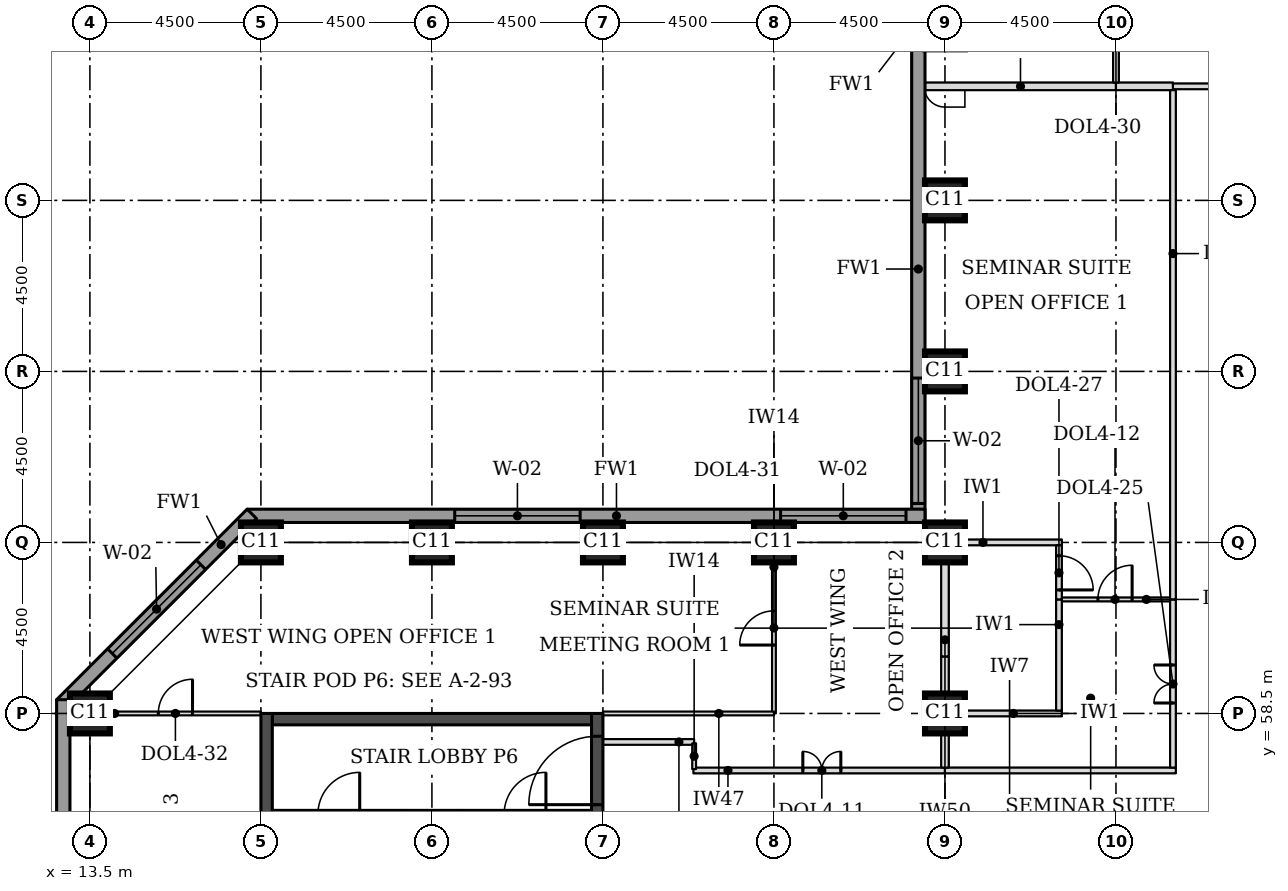
"""IFC4 building model, lengths in metres.
Left out: names, types, materials, properties, quantities, classifications, styles, units other than length and angle.
Written with IfcOpenShell. Run it as: python <this file> out.ifc"""

import sys

from ifc_helpers import new_model, si_unit, direction, frame, frame_2d, origin, origin_2d, place, context, subcontext, project, spatial, rectangle, extrude, element, fill, save


model = new_model("IFC4")
c1 = context("Model", 3, precision=1e-05, world=origin(), true_north=direction((0.0, 1.0)))
c2 = subcontext(c1, "Body", "Model", "MODEL_VIEW")
j1 = project(units=[si_unit("LENGTHUNIT", "METRE"), si_unit("PLANEANGLEUNIT", "RADIAN")], contexts=[c1])
p1 = place(None, origin())
s1 = spatial("IfcSite", under=j1, at=p1, CompositionType="ELEMENT")
p2 = place(p1, origin())
s2 = spatial("IfcBuilding", under=s1, at=p2, CompositionType="ELEMENT")
p3 = place(p2, frame((0.0, 0.0, 101.1)))
s3 = spatial("IfcBuildingStorey", under=s2, at=p3, CompositionType="ELEMENT", Elevation=101.1)
for number, where, z_axis, x_axis in (
    (1, (13.5, 58.5, 0.0), (0.0, 0.0, 1.0), (1.0, 0.0, 0.0)),
    (2, (36.0, 58.5, 0.0), (0.0, 0.0, 1.0), (1.0, 0.0, 0.0)),
    (3, (18.0, 63.0, 0.0), (0.0, 0.0, 1.0), (1.0, 0.0, 0.0)),
    (4, (22.5, 63.0, 0.0), (0.0, 0.0, 1.0), (1.0, 0.0, 0.0)),
    (5, (27.0, 63.0, 0.0), (0.0, 0.0, 1.0), (1.0, 0.0, 0.0)),
    (6, (31.5, 63.0, 0.0), (0.0, 0.0, 1.0), (1.0, 0.0, 0.0)),
    (7, (36.0, 63.0, 0.0), (0.0, 0.0, 1.0), (1.0, 0.0, 0.0)),
    (8, (36.0, 67.5, 0.0), (0.0, 0.0, 1.0), (1.0, 0.0, 0.0)),
    (9, (36.0, 72.0, 0.0), (0.0, 0.0, 1.0), (1.0, 0.0, 0.0)),
):
    element("IfcColumn", number, at=place(p3, frame(where, z_axis=z_axis, x_axis=x_axis)), inside=s3, PredefinedType="COLUMN", context=c2, shape_type="SweptSolid", body=[
        extrude(rectangle(XDim=1.05, YDim=1.05, at=origin_2d()), origin(), (0.0, 0.0, 1.0), 3.7),
    ])
p4 = place(p3, frame((18.3, 58.35, 0.0), z_axis=(0.0, 0.0, 1.0), x_axis=(1.0, 0.0, 0.0)))
e10 = element("IfcWall", 10, at=p4, inside=s3, PredefinedType="SHEAR", context=c2, shape_type="SweptSolid", body=[
    extrude(rectangle(XDim=8.4, YDim=0.3, at=frame_2d((4.2, 0.0))), origin(), (0.0, 0.0, 1.0), 3.7),
])
p5 = place(p3, frame((18.15, 49.5, 0.0), z_axis=(0.0, 0.0, 1.0), x_axis=(0.0, 1.0, 0.0)))
e11 = element("IfcWall", 11, at=p5, inside=s3, PredefinedType="SHEAR", context=c2, shape_type="SweptSolid", body=[
    extrude(rectangle(XDim=9.0, YDim=0.3, at=frame_2d((4.5, 0.0))), origin(), (0.0, 0.0, 1.0), 3.7),
])
p6 = place(p3, frame((26.85, 49.5, 0.0), z_axis=(0.0, 0.0, 1.0), x_axis=(0.0, 1.0, 0.0)))
e12 = element("IfcWall", 12, at=p6, inside=s3, PredefinedType="SHEAR", context=c2, shape_type="SweptSolid", body=[
    extrude(rectangle(XDim=9.0, YDim=0.3, at=frame_2d((4.5, 0.0))), origin(), (0.0, 0.0, 1.0), 3.7),
])
p7 = place(p6, frame((6.6, 0.0, 0.0)))
e13 = element("IfcOpeningElement", 13, at=p7, cuts=e12, PredefinedType="OPENING", context=c2, shape_type="SweptSolid", body=[
    extrude(rectangle(XDim=1.8, YDim=2.1, at=frame_2d((0.9, 1.05))), frame((0.0, 0.16, 0.0), z_axis=(0.0, -1.0, 0.0), x_axis=(1.0, 0.0, 0.0)), (0.0, 0.0, 1.0), 0.32),
])
p8 = place(p3, frame((35.3, 76.862, 0.0), z_axis=(0.0, 0.0, 1.0), x_axis=(0.0, -1.0, 0.0)))
e14 = element("IfcWall", 14, at=p8, inside=s3, PredefinedType="STANDARD", context=c2, shape_type="SweptSolid", body=[
    extrude(rectangle(XDim=13.337, YDim=0.35, at=frame_2d((6.669, 0.0))), origin(), (0.0, 0.0, 1.0), 3.525),
])
p9 = place(p8, frame((9.537, 0.0, 0.9)))
e15 = element("IfcOpeningElement", 15, at=p9, cuts=e14, PredefinedType="OPENING", context=c2, shape_type="SweptSolid", body=[
    extrude(rectangle(XDim=3.3, YDim=1.9, at=frame_2d((1.65, 0.95))), frame((0.0, 0.185, 0.0), z_axis=(0.0, -1.0, 0.0), x_axis=(1.0, 0.0, 0.0)), (0.0, 0.0, 1.0), 0.37),
])
p10 = place(p3, frame((35.475, 63.7, 0.0), z_axis=(0.0, 0.0, 1.0), x_axis=(-1.0, 0.0, 0.0)))
e16 = element("IfcWall", 16, at=p10, inside=s3, PredefinedType="STANDARD", context=c2, shape_type="SweptSolid", body=[
    extrude(rectangle(XDim=17.837, YDim=0.35, at=frame_2d((8.919, 0.0))), origin(), (0.0, 0.0, 1.0), 3.525),
])
p11 = place(p10, frame((0.5, 0.0, 0.9)))
e17 = element("IfcOpeningElement", 17, at=p11, cuts=e16, PredefinedType="OPENING", context=c2, shape_type="SweptSolid", body=[
    extrude(rectangle(XDim=3.3, YDim=1.9, at=frame_2d((1.65, 0.95))), frame((0.0, 0.185, 0.0), z_axis=(0.0, -1.0, 0.0), x_axis=(1.0, 0.0, 0.0)), (0.0, 0.0, 1.0), 0.37),
])
p12 = place(p10, frame((9.075, 0.0, 0.9)))
e18 = element("IfcOpeningElement", 18, at=p12, cuts=e16, PredefinedType="OPENING", context=c2, shape_type="SweptSolid", body=[
    extrude(rectangle(XDim=3.3, YDim=1.9, at=frame_2d((1.65, 0.95))), frame((0.0, 0.185, 0.0), z_axis=(0.0, -1.0, 0.0), x_axis=(1.0, 0.0, 0.0)), (0.0, 0.0, 1.0), 0.37),
])
p13 = place(p3, frame((17.761, 63.751, 0.0), z_axis=(0.0, 0.0, 1.0), x_axis=(-0.707106781187, -0.707106781187, 0.0)))
e19 = element("IfcWall", 19, at=p13, inside=s3, PredefinedType="STANDARD", context=c2, shape_type="SweptSolid", body=[
    extrude(rectangle(XDim=7.089, YDim=0.35, at=frame_2d((3.544, 0.0))), origin(), (0.0, 0.0, 1.0), 3.525),
])
p14 = place(p13, frame((1.894, 0.0, 0.9)))
e20 = element("IfcOpeningElement", 20, at=p14, cuts=e19, PredefinedType="OPENING", context=c2, shape_type="SweptSolid", body=[
    extrude(rectangle(XDim=3.3, YDim=1.9, at=frame_2d((1.65, 0.95))), frame((0.0, 0.185, 0.0), z_axis=(0.0, -1.0, 0.0), x_axis=(1.0, 0.0, 0.0)), (0.0, 0.0, 1.0), 0.37),
])
p15 = place(p3, frame((12.8, 58.862, 0.0), z_axis=(0.0, 0.0, 1.0), x_axis=(0.0, -1.0, 0.0)))
e21 = element("IfcWall", 21, at=p15, inside=s3, PredefinedType="STANDARD", context=c2, shape_type="SweptSolid", body=[
    extrude(rectangle(XDim=14.225, YDim=0.35, at=frame_2d((7.112, 0.0))), origin(), (0.0, 0.0, 1.0), 3.525),
])
p16 = place(p15, frame((5.462, 0.0, 0.9)))
e22 = element("IfcOpeningElement", 22, at=p16, cuts=e21, PredefinedType="OPENING", context=c2, shape_type="SweptSolid", body=[
    extrude(rectangle(XDim=3.3, YDim=1.9, at=frame_2d((1.65, 0.95))), frame((0.0, 0.185, 0.0), z_axis=(0.0, -1.0, 0.0), x_axis=(1.0, 0.0, 0.0)), (0.0, 0.0, 1.0), 0.37),
])
p17 = place(p3, frame((29.38, 57.0, 0.0), z_axis=(0.0, 0.0, 1.0), x_axis=(1.0, 0.0, 0.0)))
e23 = element("IfcWall", 23, at=p17, inside=s3, PredefinedType="PARTITIONING", context=c2, shape_type="SweptSolid", body=[
    extrude(rectangle(XDim=6.62, YDim=0.15, at=frame_2d((3.31, 0.0))), origin(), (0.0, 0.0, 1.0), 3.55),
])
p18 = place(p17, frame((2.88, 0.0, 0.0)))
e24 = element("IfcOpeningElement", 24, at=p18, cuts=e23, PredefinedType="OPENING", context=c2, shape_type="SweptSolid", body=[
    extrude(rectangle(XDim=1.0, YDim=2.1, at=frame_2d((0.5, 1.05))), frame((0.0, 0.085, 0.0), z_axis=(0.0, -1.0, 0.0), x_axis=(1.0, 0.0, 0.0)), (0.0, 0.0, 1.0), 0.17),
])
p19 = place(p3, frame((36.0, 57.0, 0.0), z_axis=(0.0, 0.0, 1.0), x_axis=(1.0, 0.0, 0.0)))
e25 = element("IfcWall", 25, at=p19, inside=s3, PredefinedType="PARTITIONING", context=c2, shape_type="SweptSolid", body=[
    extrude(rectangle(XDim=6.075, YDim=0.15, at=frame_2d((3.038, 0.0))), origin(), (0.0, 0.0, 1.0), 3.55),
])
p20 = place(p3, frame((36.525, 58.5, 0.0), z_axis=(0.0, 0.0, 1.0), x_axis=(1.0, 0.0, 0.0)))
e26 = element("IfcWall", 26, at=p20, inside=s3, PredefinedType="PARTITIONING", context=c2, shape_type="SweptSolid", body=[
    extrude(rectangle(XDim=2.55, YDim=0.15, at=frame_2d((1.275, 0.0))), origin(), (0.0, 0.0, 1.0), 3.55),
])
p21 = place(p3, frame((39.075, 61.5, 0.0), z_axis=(0.0, 0.0, 1.0), x_axis=(1.0, 0.0, 0.0)))
e27 = element("IfcWall", 27, at=p21, inside=s3, PredefinedType="PARTITIONING", context=c2, shape_type="SweptSolid", body=[
    extrude(rectangle(XDim=2.85, YDim=0.1, at=frame_2d((1.425, 0.0))), origin(), (0.0, 0.0, 1.0), 3.55),
])
p22 = place(p21, frame((0.95, 0.0, 0.0)))
e28 = element("IfcOpeningElement", 28, at=p22, cuts=e27, PredefinedType="OPENING", context=c2, shape_type="SweptSolid", body=[
    extrude(rectangle(XDim=0.9, YDim=2.1, at=frame_2d((0.45, 1.05))), frame((0.0, 0.06, 0.0), z_axis=(0.0, -1.0, 0.0), x_axis=(1.0, 0.0, 0.0)), (0.0, 0.0, 1.0), 0.12),
])
p23 = place(p3, frame((36.525, 63.0, 0.0), z_axis=(0.0, 0.0, 1.0), x_axis=(1.0, 0.0, 0.0)))
e29 = element("IfcWall", 29, at=p23, inside=s3, PredefinedType="PARTITIONING", context=c2, shape_type="SweptSolid", body=[
    extrude(rectangle(XDim=2.55, YDim=0.15, at=frame_2d((1.275, 0.0))), origin(), (0.0, 0.0, 1.0), 3.55),
])
p24 = place(p3, frame((35.475, 75.0, 0.0), z_axis=(0.0, 0.0, 1.0), x_axis=(1.0, 0.0, 0.0)))
e30 = element("IfcWall", 30, at=p24, inside=s3, PredefinedType="PARTITIONING", context=c2, shape_type="SweptSolid", body=[
    extrude(rectangle(XDim=5.025, YDim=0.2, at=frame_2d((2.512, 0.0))), origin(), (0.0, 0.0, 1.0), 3.55),
])
p25 = place(p3, frame((40.5, 75.0, 0.0), z_axis=(0.0, 0.0, 1.0), x_axis=(1.0, 0.0, 0.0)))
e31 = element("IfcWall", 31, at=p25, inside=s3, PredefinedType="PARTITIONING", context=c2, shape_type="SweptSolid", body=[
    extrude(rectangle(XDim=1.5, YDim=0.2, at=frame_2d((0.75, 0.0))), origin(), (0.0, 0.0, 1.0), 3.55),
])
p26 = place(p3, frame((42.0, 75.0, 0.0), z_axis=(0.0, 0.0, 1.0), x_axis=(1.0, 0.0, 0.0)))
e32 = element("IfcWall", 32, at=p26, inside=s3, PredefinedType="PARTITIONING", context=c2, shape_type="SweptSolid", body=[
    extrude(rectangle(XDim=4.5, YDim=0.15, at=frame_2d((2.25, 0.0))), origin(), (0.0, 0.0, 1.0), 3.55),
])
p27 = place(p26, frame((1.75, 0.0, 0.0)))
e33 = element("IfcOpeningElement", 33, at=p27, cuts=e32, PredefinedType="OPENING", context=c2, shape_type="SweptSolid", body=[
    extrude(rectangle(XDim=1.0, YDim=2.1, at=frame_2d((0.5, 1.05))), frame((0.0, 0.085, 0.0), z_axis=(0.0, -1.0, 0.0), x_axis=(1.0, 0.0, 0.0)), (0.0, 0.0, 1.0), 0.17),
])
p28 = place(p3, frame((36.0, 57.075, 0.0), z_axis=(0.0, 0.0, 1.0), x_axis=(0.0, 1.0, 0.0)))
e34 = element("IfcWall", 34, at=p28, inside=s3, PredefinedType="PARTITIONING", context=c2, shape_type="SweptSolid", body=[
    extrude(rectangle(XDim=0.9, YDim=0.2, at=frame_2d((0.45, 0.0))), origin(), (0.0, 0.0, 1.0), 2.8),
])
p29 = place(p3, frame((42.0, 57.075, 0.0), z_axis=(0.0, 0.0, 1.0), x_axis=(0.0, 1.0, 0.0)))
e35 = element("IfcWall", 35, at=p29, inside=s3, PredefinedType="PARTITIONING", context=c2, shape_type="SweptSolid", body=[
    extrude(rectangle(XDim=4.425, YDim=0.15, at=frame_2d((2.212, 0.0))), origin(), (0.0, 0.0, 1.0), 3.55),
])
p30 = place(p29, frame((1.7, 0.0, 0.0)))
e36 = element("IfcOpeningElement", 36, at=p30, cuts=e35, PredefinedType="OPENING", context=c2, shape_type="SweptSolid", body=[
    extrude(rectangle(XDim=1.0, YDim=2.1, at=frame_2d((0.5, 1.05))), frame((0.0, 0.085, 0.0), z_axis=(0.0, -1.0, 0.0), x_axis=(1.0, 0.0, 0.0)), (0.0, 0.0, 1.0), 0.17),
])
p31 = place(p3, frame((39.0, 58.575, 0.0), z_axis=(0.0, 0.0, 1.0), x_axis=(0.0, 1.0, 0.0)))
e37 = element("IfcWall", 37, at=p31, inside=s3, PredefinedType="PARTITIONING", context=c2, shape_type="SweptSolid", body=[
    extrude(rectangle(XDim=2.925, YDim=0.15, at=frame_2d((1.462, 0.0))), origin(), (0.0, 0.0, 1.0), 3.55),
])
p32 = place(p3, frame((36.0, 58.995, 0.0), z_axis=(0.0, 0.0, 1.0), x_axis=(0.0, 1.0, 0.0)))
e38 = element("IfcWall", 38, at=p32, inside=s3, PredefinedType="PARTITIONING", context=c2, shape_type="SweptSolid", body=[
    extrude(rectangle(XDim=1.005, YDim=0.2, at=frame_2d((0.502, 0.0))), origin(), (0.0, 0.0, 1.0), 2.8),
])
p33 = place(p3, frame((36.0, 60.0, 0.0), z_axis=(0.0, 0.0, 1.0), x_axis=(0.0, 1.0, 0.0)))
e39 = element("IfcWall", 39, at=p33, inside=s3, PredefinedType="PARTITIONING", context=c2, shape_type="SweptSolid", body=[
    extrude(rectangle(XDim=2.475, YDim=0.2, at=frame_2d((1.238, 0.0))), origin(), (0.0, 0.0, 1.0), 2.8),
])
p34 = place(p3, frame((39.0, 61.5, 0.0), z_axis=(0.0, 0.0, 1.0), x_axis=(0.0, 1.0, 0.0)))
e40 = element("IfcWall", 40, at=p34, inside=s3, PredefinedType="PARTITIONING", context=c2, shape_type="SweptSolid", body=[
    extrude(rectangle(XDim=1.425, YDim=0.15, at=frame_2d((0.712, 0.0))), origin(), (0.0, 0.0, 1.0), 3.55),
])
p35 = place(p34, frame((0.25, 0.0, 0.0)))
e41 = element("IfcOpeningElement", 41, at=p35, cuts=e40, PredefinedType="OPENING", context=c2, shape_type="SweptSolid", body=[
    extrude(rectangle(XDim=0.9, YDim=2.1, at=frame_2d((0.45, 1.05))), frame((0.0, 0.085, 0.0), z_axis=(0.0, -1.0, 0.0), x_axis=(1.0, 0.0, 0.0)), (0.0, 0.0, 1.0), 0.17),
])
p36 = place(p3, frame((42.0, 61.5, 0.0), z_axis=(0.0, 0.0, 1.0), x_axis=(0.0, 1.0, 0.0)))
e42 = element("IfcWall", 42, at=p36, inside=s3, PredefinedType="PARTITIONING", context=c2, shape_type="SweptSolid", body=[
    extrude(rectangle(XDim=13.4, YDim=0.15, at=frame_2d((6.7, 0.0))), origin(), (0.0, 0.0, 1.0), 3.55),
])
p37 = place(p3, frame((40.5, 75.1, 0.0), z_axis=(0.0, 0.0, 1.0), x_axis=(0.0, 1.0, 0.0)))
e43 = element("IfcWall", 43, at=p37, inside=s3, PredefinedType="PARTITIONING", context=c2, shape_type="SweptSolid", body=[
    extrude(rectangle(XDim=2.9, YDim=0.15, at=frame_2d((1.45, 0.0))), origin(), (0.0, 0.0, 1.0), 3.55),
])
p38 = place(p37, frame((1.0, 0.0, 0.0)))
e44 = element("IfcOpeningElement", 44, at=p38, cuts=e43, PredefinedType="OPENING", context=c2, shape_type="SweptSolid", body=[
    extrude(rectangle(XDim=0.9, YDim=2.1, at=frame_2d((0.45, 1.05))), frame((0.0, 0.085, 0.0), z_axis=(0.0, -1.0, 0.0), x_axis=(1.0, 0.0, 0.0)), (0.0, 0.0, 1.0), 0.17),
])
p39 = place(p3, frame((31.5, 63.0, 0.0), z_axis=(0.0, 0.0, 1.0), x_axis=(0.0, -1.0, 0.0)))
e45 = element("IfcWall", 45, at=p39, inside=s3, PredefinedType="PARTITIONING", context=c2, shape_type="SweptSolid", body=[
    extrude(rectangle(XDim=4.5, YDim=0.1, at=frame_2d((2.25, 0.0))), origin(), (0.0, 0.0, 1.0), 3.55),
])
p40 = place(p39, frame((1.8, 0.0, 0.0)))
e46 = element("IfcOpeningElement", 46, at=p40, cuts=e45, PredefinedType="OPENING", context=c2, shape_type="SweptSolid", body=[
    extrude(rectangle(XDim=0.9, YDim=2.1, at=frame_2d((0.45, 1.05))), frame((0.0, 0.06, 0.0), z_axis=(0.0, -1.0, 0.0), x_axis=(1.0, 0.0, 0.0)), (0.0, 0.0, 1.0), 0.12),
])
p41 = place(p3, frame((31.5, 58.5, 0.0), z_axis=(0.0, 0.0, 1.0), x_axis=(-1.0, 0.0, 0.0)))
e47 = element("IfcWall", 47, at=p41, inside=s3, PredefinedType="PARTITIONING", context=c2, shape_type="SweptSolid", body=[
    extrude(rectangle(XDim=4.5, YDim=0.1, at=frame_2d((2.25, 0.0))), origin(), (0.0, 0.0, 1.0), 2.55),
])
p42 = place(p3, frame((13.5, 58.5, 0.0), z_axis=(0.0, 0.0, 1.0), x_axis=(1.0, 0.0, 0.0)))
e48 = element("IfcWall", 48, at=p42, inside=s3, PredefinedType="PARTITIONING", context=c2, shape_type="SweptSolid", body=[
    extrude(rectangle(XDim=4.5, YDim=0.1, at=frame_2d((2.25, 0.0))), origin(), (0.0, 0.0, 1.0), 2.55),
])
p43 = place(p42, frame((1.8, 0.0, 0.0)))
e49 = element("IfcOpeningElement", 49, at=p43, cuts=e48, PredefinedType="OPENING", context=c2, shape_type="SweptSolid", body=[
    extrude(rectangle(XDim=0.9, YDim=2.1, at=frame_2d((0.45, 1.05))), frame((0.0, 0.06, 0.0), z_axis=(0.0, -1.0, 0.0), x_axis=(1.0, 0.0, 0.0)), (0.0, 0.0, 1.0), 0.12),
])
p44 = place(p3, frame((27.0, 57.75, 0.0), z_axis=(0.0, 0.0, 1.0), x_axis=(1.0, 0.0, 0.0)))
e50 = element("IfcWall", 50, at=p44, inside=s3, PredefinedType="PARTITIONING", context=c2, shape_type="SweptSolid", body=[
    extrude(rectangle(XDim=2.4, YDim=0.15, at=frame_2d((1.2, 0.0))), origin(), (0.0, 0.0, 1.0), 3.55),
])
p45 = place(p3, frame((29.4, 57.715, 0.0), z_axis=(0.0, 0.0, 1.0), x_axis=(0.0, -1.0, 0.0)))
e51 = element("IfcWall", 51, at=p45, inside=s3, PredefinedType="PARTITIONING", context=c2, shape_type="SweptSolid", body=[
    extrude(rectangle(XDim=0.68, YDim=0.1, at=frame_2d((0.34, 0.0))), origin(), (0.0, 0.0, 1.0), 3.55),
])
p46 = place(p3, frame((21.8, 55.85, 0.0), z_axis=(0.0, 0.0, 1.0), x_axis=(1.0, 0.0, 0.0)))
e52 = element("IfcWall", 52, at=p46, inside=s3, PredefinedType="SOLIDWALL", context=c2, shape_type="SweptSolid", body=[
    extrude(rectangle(XDim=1.4, YDim=0.2, at=frame_2d((0.7, 0.0))), origin(), (0.0, 0.0, 1.0), 3.55),
])
p47 = place(p3, frame((18.3, 55.85, 0.0), z_axis=(0.0, 0.0, 1.0), x_axis=(1.0, 0.0, 0.0)))
e53 = element("IfcWall", 53, at=p47, inside=s3, PredefinedType="SOLIDWALL", context=c2, shape_type="SweptSolid", body=[
    extrude(rectangle(XDim=3.5, YDim=0.2, at=frame_2d((1.75, 0.0))), origin(), (0.0, 0.0, 1.0), 3.55),
])
p48 = place(p47, frame((1.2, 0.0, 0.0)))
e54 = element("IfcOpeningElement", 54, at=p48, cuts=e53, PredefinedType="OPENING", context=c2, shape_type="SweptSolid", body=[
    extrude(rectangle(XDim=1.1, YDim=2.1, at=frame_2d((0.55, 1.05))), frame((0.0, 0.11, 0.0), z_axis=(0.0, -1.0, 0.0), x_axis=(1.0, 0.0, 0.0)), (0.0, 0.0, 1.0), 0.22),
])
p49 = place(p3, frame((23.2, 55.85, 0.0), z_axis=(0.0, 0.0, 1.0), x_axis=(1.0, 0.0, 0.0)))
e55 = element("IfcWall", 55, at=p49, inside=s3, PredefinedType="SOLIDWALL", context=c2, shape_type="SweptSolid", body=[
    extrude(rectangle(XDim=3.5, YDim=0.2, at=frame_2d((1.75, 0.0))), origin(), (0.0, 0.0, 1.0), 3.55),
])
p50 = place(p49, frame((1.2, 0.0, 0.0)))
e56 = element("IfcOpeningElement", 56, at=p50, cuts=e55, PredefinedType="OPENING", context=c2, shape_type="SweptSolid", body=[
    extrude(rectangle(XDim=1.1, YDim=2.1, at=frame_2d((0.55, 1.05))), frame((0.0, 0.11, 0.0), z_axis=(0.0, -1.0, 0.0), x_axis=(1.0, 0.0, 0.0)), (0.0, 0.0, 1.0), 0.22),
])
p51 = place(p9, origin())
e57 = element("IfcWindow", 57, at=p51, inside=s3, PartitioningType="SINGLE_PANEL", PredefinedType="WINDOW", context=c2, shape_type="SweptSolid", body=[
    extrude(rectangle(XDim=3.3, YDim=1.9, at=frame_2d((1.65, 0.95))), frame((0.0, 0.085, 0.0), z_axis=(0.0, -1.0, 0.0), x_axis=(1.0, 0.0, 0.0)), (0.0, 0.0, 1.0), 0.06),
])
fill(e15, e57)
p52 = place(p11, origin())
e58 = element("IfcWindow", 58, at=p52, inside=s3, PartitioningType="SINGLE_PANEL", PredefinedType="WINDOW", context=c2, shape_type="SweptSolid", body=[
    extrude(rectangle(XDim=3.3, YDim=1.9, at=frame_2d((1.65, 0.95))), frame((0.0, 0.085, 0.0), z_axis=(0.0, -1.0, 0.0), x_axis=(1.0, 0.0, 0.0)), (0.0, 0.0, 1.0), 0.06),
])
fill(e17, e58)
p53 = place(p12, origin())
e59 = element("IfcWindow", 59, at=p53, inside=s3, PartitioningType="SINGLE_PANEL", PredefinedType="WINDOW", context=c2, shape_type="SweptSolid", body=[
    extrude(rectangle(XDim=3.3, YDim=1.9, at=frame_2d((1.65, 0.95))), frame((0.0, 0.085, 0.0), z_axis=(0.0, -1.0, 0.0), x_axis=(1.0, 0.0, 0.0)), (0.0, 0.0, 1.0), 0.06),
])
fill(e18, e59)
p54 = place(p14, origin())
e60 = element("IfcWindow", 60, at=p54, inside=s3, PartitioningType="SINGLE_PANEL", PredefinedType="WINDOW", context=c2, shape_type="SweptSolid", body=[
    extrude(rectangle(XDim=3.3, YDim=1.9, at=frame_2d((1.65, 0.95))), frame((0.0, 0.085, 0.0), z_axis=(0.0, -1.0, 0.0), x_axis=(1.0, 0.0, 0.0)), (0.0, 0.0, 1.0), 0.06),
])
fill(e20, e60)
p55 = place(p30, origin())
e61 = element("IfcDoor", 61, at=p55, inside=s3, OperationType="DOUBLE_DOOR_SINGLE_SWING", PredefinedType="DOOR", context=c2, shape_type="SweptSolid", body=[
    extrude(rectangle(XDim=1.0, YDim=2.1, at=frame_2d((0.5, 1.05))), frame((0.0, 0.025, 0.0), z_axis=(0.0, -1.0, 0.0), x_axis=(1.0, 0.0, 0.0)), (0.0, 0.0, 1.0), 0.05),
])
fill(e36, e61)
p56 = place(p22, origin())
e62 = element("IfcDoor", 62, at=p56, inside=s3, OperationType="SINGLE_SWING_RIGHT", PredefinedType="DOOR", context=c2, shape_type="SweptSolid", body=[
    extrude(rectangle(XDim=0.9, YDim=2.1, at=frame_2d((0.45, 1.05))), frame((0.0, 0.025, 0.0), z_axis=(0.0, -1.0, 0.0), x_axis=(1.0, 0.0, 0.0)), (0.0, 0.0, 1.0), 0.05),
])
fill(e28, e62)
p57 = place(p35, frame((0.9, 0.0, 0.0), z_axis=(0.0, 0.0, 1.0), x_axis=(-1.0, 0.0, 0.0)))
e63 = element("IfcDoor", 63, at=p57, inside=s3, OperationType="SINGLE_SWING_RIGHT", PredefinedType="DOOR", context=c2, shape_type="SweptSolid", body=[
    extrude(rectangle(XDim=0.9, YDim=2.1, at=frame_2d((0.45, 1.05))), frame((0.0, 0.025, 0.0), z_axis=(0.0, -1.0, 0.0), x_axis=(1.0, 0.0, 0.0)), (0.0, 0.0, 1.0), 0.05),
])
fill(e41, e63)
p58 = place(p18, origin())
e64 = element("IfcDoor", 64, at=p58, inside=s3, OperationType="DOUBLE_DOOR_SINGLE_SWING", PredefinedType="DOOR", context=c2, shape_type="SweptSolid", body=[
    extrude(rectangle(XDim=1.0, YDim=2.1, at=frame_2d((0.5, 1.05))), frame((0.0, 0.025, 0.0), z_axis=(0.0, -1.0, 0.0), x_axis=(1.0, 0.0, 0.0)), (0.0, 0.0, 1.0), 0.05),
])
fill(e24, e64)
p59 = place(p40, frame((0.9, 0.0, 0.0), z_axis=(0.0, 0.0, 1.0), x_axis=(-1.0, 0.0, 0.0)))
e65 = element("IfcDoor", 65, at=p59, inside=s3, OperationType="SINGLE_SWING_LEFT", PredefinedType="DOOR", context=c2, shape_type="SweptSolid", body=[
    extrude(rectangle(XDim=0.9, YDim=2.1, at=frame_2d((0.45, 1.05))), frame((0.0, 0.025, 0.0), z_axis=(0.0, -1.0, 0.0), x_axis=(1.0, 0.0, 0.0)), (0.0, 0.0, 1.0), 0.05),
])
fill(e46, e65)
p60 = place(p43, origin())
e66 = element("IfcDoor", 66, at=p60, inside=s3, OperationType="SINGLE_SWING_RIGHT", PredefinedType="DOOR", context=c2, shape_type="SweptSolid", body=[
    extrude(rectangle(XDim=0.9, YDim=2.1, at=frame_2d((0.45, 1.05))), frame((0.0, 0.025, 0.0), z_axis=(0.0, -1.0, 0.0), x_axis=(1.0, 0.0, 0.0)), (0.0, 0.0, 1.0), 0.05),
])
fill(e49, e66)
p61 = place(p7, origin())
e67 = element("IfcDoor", 67, at=p61, inside=s3, OperationType="SINGLE_SWING_LEFT", PredefinedType="DOOR", context=c2, shape_type="SweptSolid", body=[
    extrude(rectangle(XDim=1.8, YDim=2.1, at=frame_2d((0.9, 1.05))), frame((0.0, 0.025, 0.0), z_axis=(0.0, -1.0, 0.0), x_axis=(1.0, 0.0, 0.0)), (0.0, 0.0, 1.0), 0.05),
])
fill(e13, e67)
save(model, sys.argv[1])
